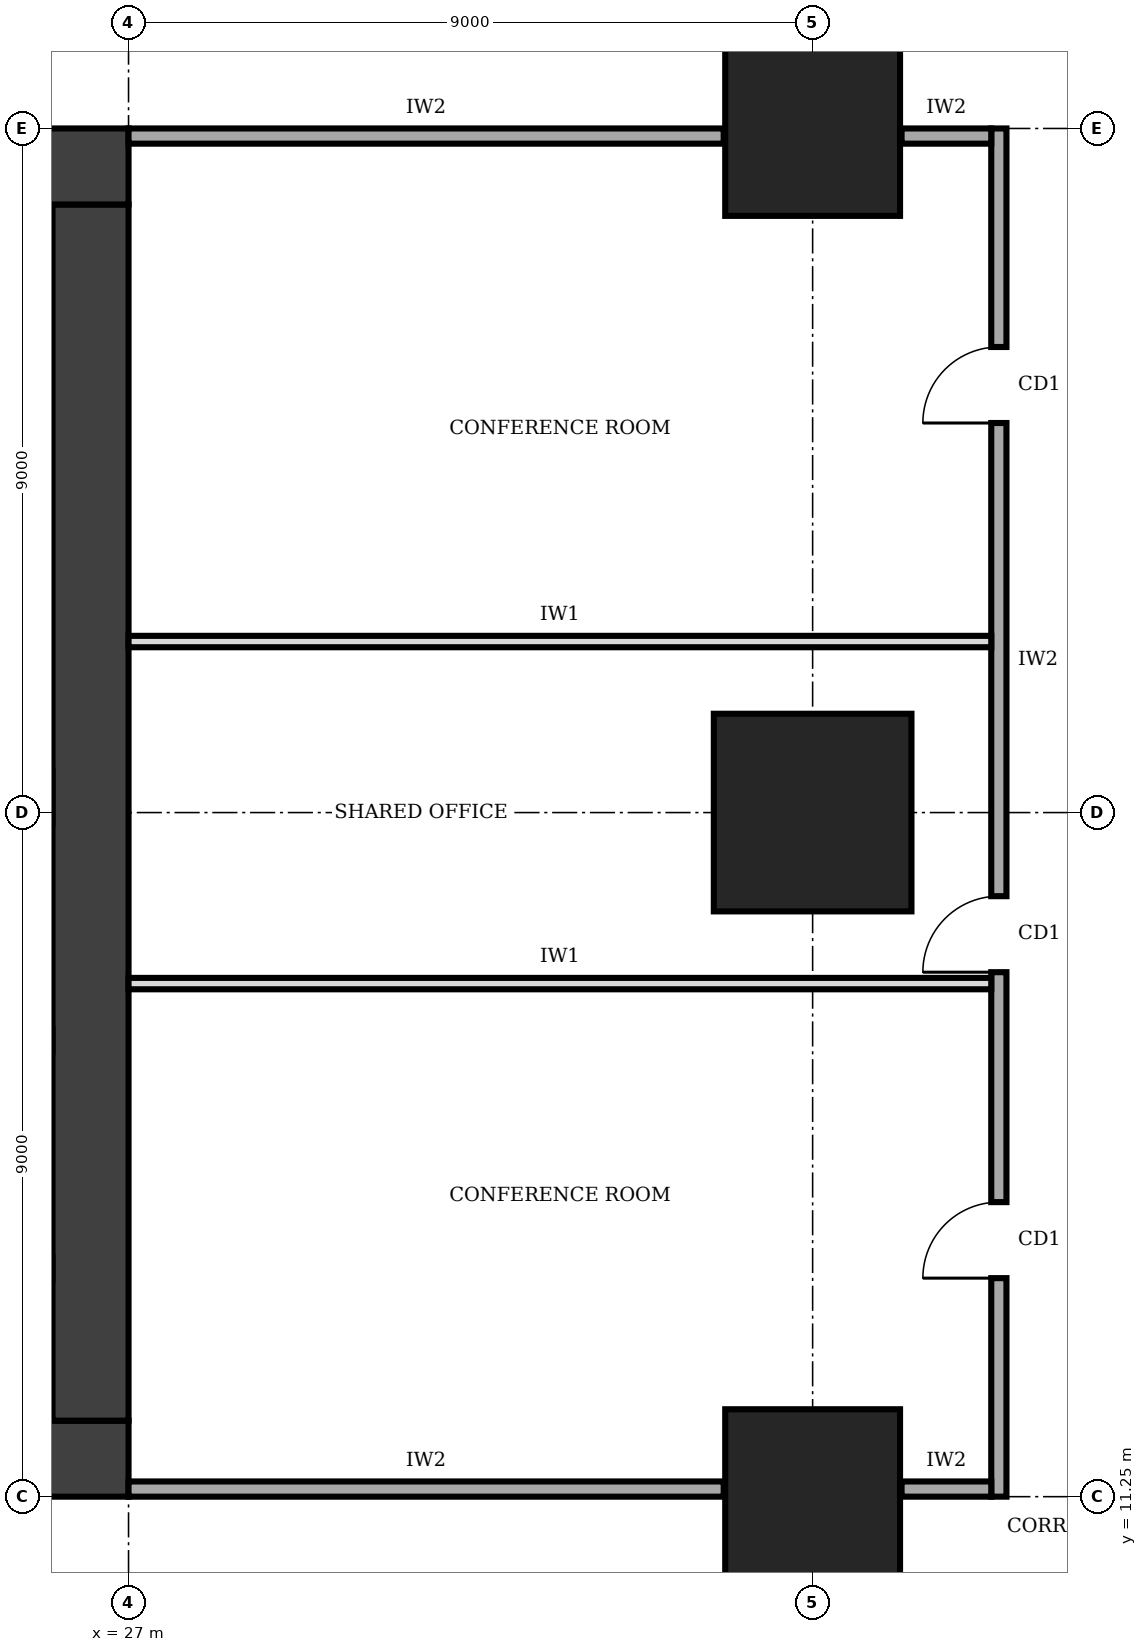
"""IFC4 building model, lengths in metres.
Left out: names, types, materials, properties, quantities, classifications, styles, units other than length and angle.
Written with IfcOpenShell. Run it as: python <this file> out.ifc"""

import sys

from ifc_helpers import new_model, si_unit, direction, frame, frame_2d, origin, origin_2d, place, context, subcontext, project, spatial, rectangle, extrude, element, fill, save


model = new_model("IFC4")
c1 = context("Model", 3, precision=1e-05, world=origin(), true_north=direction((0.0, 1.0)))
c2 = subcontext(c1, "Body", "Model", "MODEL_VIEW")
j1 = project(units=[si_unit("LENGTHUNIT", "METRE"), si_unit("PLANEANGLEUNIT", "RADIAN")], contexts=[c1])
p1 = place(None, origin())
s1 = spatial("IfcSite", under=j1, at=p1, CompositionType="ELEMENT")
p2 = place(p1, origin())
s2 = spatial("IfcBuilding", under=s1, at=p2, CompositionType="ELEMENT")
p3 = place(p2, frame((0.0, 0.0, 101.0)))
s3 = spatial("IfcBuildingStorey", under=s2, at=p3, CompositionType="ELEMENT", Elevation=101.0)
p4 = place(p3, frame((13.5, 11.75, 0.0), z_axis=(0.0, 0.0, 1.0), x_axis=(1.0, 0.0, 0.0)))
e1 = element("IfcWall", 1, at=p4, inside=s3, PredefinedType="SHEAR", context=c2, shape_type="SweptSolid", body=[
    extrude(rectangle(XDim=13.5, YDim=1.0, at=frame_2d((6.75, 0.0))), origin(), (0.0, 0.0, 1.0), 4.0),
])
p5 = place(p4, frame((4.75, 0.0, 0.0)))
e2 = element("IfcOpeningElement", 2, at=p5, cuts=e1, PredefinedType="OPENING", context=c2, shape_type="SweptSolid", body=[
    extrude(rectangle(XDim=1.0, YDim=2.1, at=frame_2d((0.5, 1.05))), frame((0.0, 0.51, 0.0), z_axis=(0.0, -1.0, 0.0), x_axis=(1.0, 0.0, 0.0)), (0.0, 0.0, 1.0), 1.02),
])
p6 = place(p3, frame((26.5, 12.25, 0.0), z_axis=(0.0, 0.0, 1.0), x_axis=(0.0, 1.0, 0.0)))
e3 = element("IfcWall", 3, at=p6, inside=s3, PredefinedType="SHEAR", context=c2, shape_type="SweptSolid", body=[
    extrude(rectangle(XDim=16.0, YDim=1.0, at=frame_2d((8.0, 0.0))), origin(), (0.0, 0.0, 1.0), 4.0),
])
p7 = place(p3, frame((27.0, 28.75, 0.0), z_axis=(0.0, 0.0, 1.0), x_axis=(-1.0, 0.0, 0.0)))
e4 = element("IfcWall", 4, at=p7, inside=s3, PredefinedType="SHEAR", context=c2, shape_type="SweptSolid", body=[
    extrude(rectangle(XDim=13.5, YDim=1.0, at=frame_2d((6.75, 0.0))), origin(), (0.0, 0.0, 1.0), 4.0),
])
p8 = place(p7, frame((4.75, 0.0, 0.0)))
e5 = element("IfcOpeningElement", 5, at=p8, cuts=e4, PredefinedType="OPENING", context=c2, shape_type="SweptSolid", body=[
    extrude(rectangle(XDim=1.8, YDim=2.1, at=frame_2d((0.9, 1.05))), frame((0.0, 0.51, 0.0), z_axis=(0.0, -1.0, 0.0), x_axis=(1.0, 0.0, 0.0)), (0.0, 0.0, 1.0), 1.02),
])
p9 = place(p3, frame((36.0, 11.25, 0.0), z_axis=(0.0, 0.0, 1.0), x_axis=(1.0, 0.0, 0.0)))
e6 = element("IfcColumn", 6, at=p9, inside=s3, PredefinedType="COLUMN", context=c2, shape_type="SweptSolid", body=[
    extrude(rectangle(XDim=2.3, YDim=2.3, at=origin_2d()), origin(), (0.0, 0.0, 1.0), 4.0),
])
p10 = place(p3, frame((36.0, 20.25, 0.0), z_axis=(0.0, 0.0, 1.0), x_axis=(1.0, 0.0, 0.0)))
e7 = element("IfcColumn", 7, at=p10, inside=s3, PredefinedType="COLUMN", context=c2, shape_type="SweptSolid", body=[
    extrude(rectangle(XDim=2.6, YDim=2.6, at=origin_2d()), origin(), (0.0, 0.0, 1.0), 4.0),
])
p11 = place(p3, frame((36.0, 29.25, 0.0), z_axis=(0.0, 0.0, 1.0), x_axis=(1.0, 0.0, 0.0)))
e8 = element("IfcColumn", 8, at=p11, inside=s3, PredefinedType="COLUMN", context=c2, shape_type="SweptSolid", body=[
    extrude(rectangle(XDim=2.3, YDim=2.3, at=origin_2d()), origin(), (0.0, 0.0, 1.0), 4.0),
])
p12 = place(p3, frame((38.45, 11.25, 0.0), z_axis=(0.0, 0.0, 1.0), x_axis=(0.0, 1.0, 0.0)))
e9 = element("IfcWall", 9, at=p12, inside=s3, PredefinedType="SOLIDWALL", context=c2, shape_type="SweptSolid", body=[
    extrude(rectangle(XDim=18.0, YDim=0.2, at=frame_2d((9.0, 0.0))), origin(), (0.0, 0.0, 1.0), 3.75),
])
p13 = place(p12, frame((2.875, 0.0, 0.0)))
e10 = element("IfcOpeningElement", 10, at=p13, cuts=e9, PredefinedType="OPENING", context=c2, shape_type="SweptSolid", body=[
    extrude(rectangle(XDim=1.0, YDim=2.1, at=frame_2d((0.5, 1.05))), frame((0.0, 0.11, 0.0), z_axis=(0.0, -1.0, 0.0), x_axis=(1.0, 0.0, 0.0)), (0.0, 0.0, 1.0), 0.22),
])
p14 = place(p12, frame((6.9, 0.0, 0.0)))
e11 = element("IfcOpeningElement", 11, at=p14, cuts=e9, PredefinedType="OPENING", context=c2, shape_type="SweptSolid", body=[
    extrude(rectangle(XDim=1.0, YDim=2.1, at=frame_2d((0.5, 1.05))), frame((0.0, 0.11, 0.0), z_axis=(0.0, -1.0, 0.0), x_axis=(1.0, 0.0, 0.0)), (0.0, 0.0, 1.0), 0.22),
])
p15 = place(p12, frame((14.125, 0.0, 0.0)))
e12 = element("IfcOpeningElement", 12, at=p15, cuts=e9, PredefinedType="OPENING", context=c2, shape_type="SweptSolid", body=[
    extrude(rectangle(XDim=1.0, YDim=2.1, at=frame_2d((0.5, 1.05))), frame((0.0, 0.11, 0.0), z_axis=(0.0, -1.0, 0.0), x_axis=(1.0, 0.0, 0.0)), (0.0, 0.0, 1.0), 0.22),
])
p16 = place(p3, frame((27.0, 11.35, 0.0), z_axis=(0.0, 0.0, 1.0), x_axis=(1.0, 0.0, 0.0)))
e13 = element("IfcWall", 13, at=p16, inside=s3, PredefinedType="SOLIDWALL", context=c2, shape_type="SweptSolid", body=[
    extrude(rectangle(XDim=7.83, YDim=0.2, at=frame_2d((3.915, 0.0))), origin(), (0.0, 0.0, 1.0), 3.75),
])
p17 = place(p3, frame((37.17, 11.35, 0.0), z_axis=(0.0, 0.0, 1.0), x_axis=(1.0, 0.0, 0.0)))
e14 = element("IfcWall", 14, at=p17, inside=s3, PredefinedType="SOLIDWALL", context=c2, shape_type="SweptSolid", body=[
    extrude(rectangle(XDim=1.18, YDim=0.2, at=frame_2d((0.59, 0.0))), origin(), (0.0, 0.0, 1.0), 3.75),
])
p18 = place(p3, frame((27.0, 29.15, 0.0), z_axis=(0.0, 0.0, 1.0), x_axis=(1.0, 0.0, 0.0)))
e15 = element("IfcWall", 15, at=p18, inside=s3, PredefinedType="SOLIDWALL", context=c2, shape_type="SweptSolid", body=[
    extrude(rectangle(XDim=7.83, YDim=0.2, at=frame_2d((3.915, 0.0))), origin(), (0.0, 0.0, 1.0), 3.75),
])
p19 = place(p3, frame((37.17, 29.15, 0.0), z_axis=(0.0, 0.0, 1.0), x_axis=(1.0, 0.0, 0.0)))
e16 = element("IfcWall", 16, at=p19, inside=s3, PredefinedType="SOLIDWALL", context=c2, shape_type="SweptSolid", body=[
    extrude(rectangle(XDim=1.18, YDim=0.2, at=frame_2d((0.59, 0.0))), origin(), (0.0, 0.0, 1.0), 3.75),
])
for number, where, z_axis, x_axis in (
    (17, (27.0, 18.0, 0.0), (0.0, 0.0, 1.0), (1.0, 0.0, 0.0)),
    (18, (27.0, 22.5, 0.0), (0.0, 0.0, 1.0), (1.0, 0.0, 0.0)),
):
    element("IfcWall", number, at=place(p3, frame(where, z_axis=z_axis, x_axis=x_axis)), inside=s3, PredefinedType="PARTITIONING", context=c2, shape_type="SweptSolid", body=[
        extrude(rectangle(XDim=11.35, YDim=0.15, at=frame_2d((5.675, 0.0))), origin(), (0.0, 0.0, 1.0), 3.75),
    ])
p20 = place(p13, origin())
e19 = element("IfcDoor", 19, at=p20, inside=s3, OperationType="SINGLE_SWING_LEFT", PredefinedType="DOOR", context=c2, shape_type="SweptSolid", body=[
    extrude(rectangle(XDim=1.0, YDim=2.1, at=frame_2d((0.5, 1.05))), frame((0.0, 0.025, 0.0), z_axis=(0.0, -1.0, 0.0), x_axis=(1.0, 0.0, 0.0)), (0.0, 0.0, 1.0), 0.05),
])
fill(e10, e19)
p21 = place(p14, origin())
e20 = element("IfcDoor", 20, at=p21, inside=s3, OperationType="SINGLE_SWING_LEFT", PredefinedType="DOOR", context=c2, shape_type="SweptSolid", body=[
    extrude(rectangle(XDim=1.0, YDim=2.1, at=frame_2d((0.5, 1.05))), frame((0.0, 0.025, 0.0), z_axis=(0.0, -1.0, 0.0), x_axis=(1.0, 0.0, 0.0)), (0.0, 0.0, 1.0), 0.05),
])
fill(e11, e20)
p22 = place(p15, origin())
e21 = element("IfcDoor", 21, at=p22, inside=s3, OperationType="SINGLE_SWING_LEFT", PredefinedType="DOOR", context=c2, shape_type="SweptSolid", body=[
    extrude(rectangle(XDim=1.0, YDim=2.1, at=frame_2d((0.5, 1.05))), frame((0.0, 0.025, 0.0), z_axis=(0.0, -1.0, 0.0), x_axis=(1.0, 0.0, 0.0)), (0.0, 0.0, 1.0), 0.05),
])
fill(e12, e21)
save(model, sys.argv[1])
